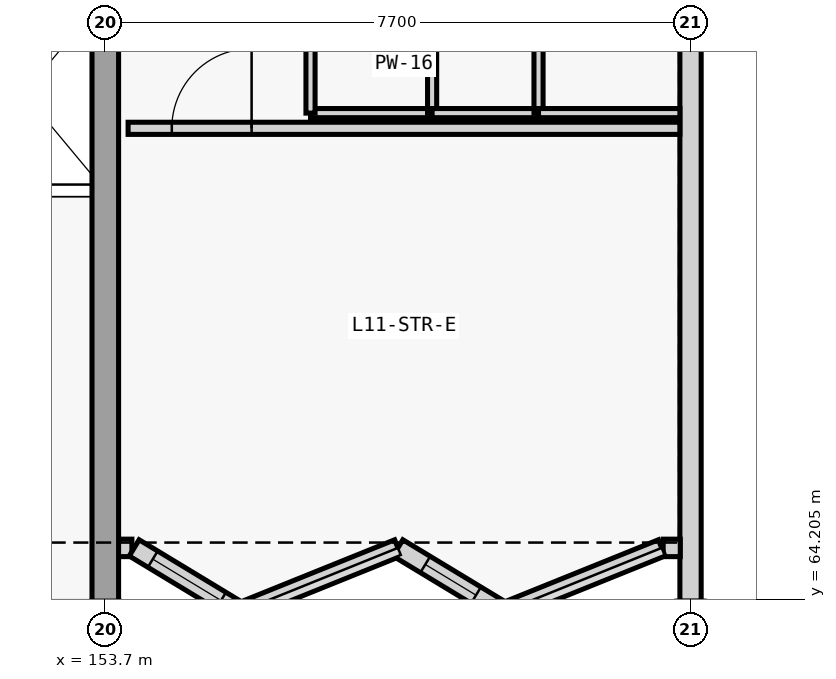
"""IFC4 building model, lengths in metres.
Left out: names, types, materials, properties, quantities, classifications, styles, units other than length and angle.
Written with IfcOpenShell. Run it as: python <this file> out.ifc"""

import sys

from ifc_helpers import new_model, si_unit, direction, frame, frame_2d, origin, place, context, subcontext, project, spatial, rectangle, extrude, element, fill, save


model = new_model("IFC4")
c1 = context("Model", 3, precision=1e-05, world=origin(), true_north=direction((0.0, 1.0)))
c2 = subcontext(c1, "Body", "Model", "MODEL_VIEW")
j1 = project(units=[si_unit("LENGTHUNIT", "METRE"), si_unit("PLANEANGLEUNIT", "RADIAN")], contexts=[c1])
p1 = place(None, origin())
s1 = spatial("IfcSite", under=j1, at=p1, CompositionType="ELEMENT")
p2 = place(p1, origin())
s2 = spatial("IfcBuilding", under=s1, at=p2, CompositionType="ELEMENT")
p3 = place(p2, frame((0.0, 0.0, 43.2)))
s3 = spatial("IfcBuildingStorey", under=s2, at=p3, CompositionType="ELEMENT", Elevation=43.2)
p4 = place(p3, frame((161.4, 96.822, 0.0), z_axis=(0.0, 0.0, 1.0), x_axis=(0.0, -1.0, 0.0)))
e1 = element("IfcWall", 1, at=p4, inside=s3, PredefinedType="SOLIDWALL", context=c2, shape_type="SweptSolid", body=[
    extrude(rectangle(XDim=32.644, YDim=0.28, at=frame_2d((16.322, 0.0))), origin(), (0.0, 0.0, 1.0), 3.06),
])
p5 = place(p4, frame((17.522, 0.0, 0.82)))
e2 = element("IfcOpeningElement", 2, at=p5, cuts=e1, PredefinedType="OPENING", context=c2, shape_type="SweptSolid", body=[
    extrude(rectangle(XDim=3.9, YDim=1.45, at=frame_2d((1.95, 0.725))), frame((0.0, 0.15, 0.0), z_axis=(0.0, -1.0, 0.0), x_axis=(1.0, 0.0, 0.0)), (0.0, 0.0, 1.0), 0.3),
])
p6 = place(p3, frame((154.05, 64.88, 0.0), z_axis=(0.0, 0.0, 1.0), x_axis=(-1.0, 0.0, 0.0)))
e3 = element("IfcWall", 3, at=p6, inside=s3, PredefinedType="SOLIDWALL", context=c2, shape_type="SweptSolid", body=[
    extrude(rectangle(XDim=0.18, YDim=0.23, at=frame_2d((0.09, 0.0))), origin(), (0.0, 0.0, 1.0), 3.66),
])
p7 = place(p3, frame((161.265, 64.88, 0.0), z_axis=(0.0, 0.0, 1.0), x_axis=(-1.0, 0.0, 0.0)))
e4 = element("IfcWall", 4, at=p7, inside=s3, PredefinedType="SOLIDWALL", context=c2, shape_type="SweptSolid", body=[
    extrude(rectangle(XDim=0.225, YDim=0.23, at=frame_2d((0.112, 0.0))), origin(), (0.0, 0.0, 1.0), 3.66),
])
p8 = place(p3, frame((155.468, 64.04, 0.0), z_axis=(0.0, 0.0, 1.0), x_axis=(-0.855561475997, 0.51770122734, 0.0)))
e5 = element("IfcWall", 5, at=p8, inside=s3, PredefinedType="SOLIDWALL", context=c2, shape_type="SweptSolid", body=[
    extrude(rectangle(XDim=1.622, YDim=0.25, at=frame_2d((0.811, 0.0))), origin(), (0.0, 0.0, 1.0), 3.66),
])
p9 = place(p8, frame((0.286, 0.0, 0.82)))
e6 = element("IfcOpeningElement", 6, at=p9, cuts=e5, PredefinedType="OPENING", context=c2, shape_type="SweptSolid", body=[
    extrude(rectangle(XDim=1.05, YDim=1.4, at=frame_2d((0.525, 0.7))), frame((0.0, 0.135, 0.0), z_axis=(0.0, -1.0, 0.0), x_axis=(1.0, 0.0, 0.0)), (0.0, 0.0, 1.0), 0.27),
])
p10 = place(p3, frame((157.55, 64.88, 0.0), z_axis=(0.0, 0.0, 1.0), x_axis=(-0.927392797001, -0.374089026933, 0.0)))
e7 = element("IfcWall", 7, at=p10, inside=s3, PredefinedType="SOLIDWALL", context=c2, shape_type="SweptSolid", body=[
    extrude(rectangle(XDim=2.245, YDim=0.23, at=frame_2d((1.123, 0.0))), origin(), (0.0, 0.0, 1.0), 3.66),
])
p11 = place(p3, frame((158.938, 64.04, 0.0), z_axis=(0.0, 0.0, 1.0), x_axis=(-0.855561475997, 0.51770122734, 0.0)))
e8 = element("IfcWall", 8, at=p11, inside=s3, PredefinedType="SOLIDWALL", context=c2, shape_type="SweptSolid", body=[
    extrude(rectangle(XDim=1.622, YDim=0.25, at=frame_2d((0.811, 0.0))), origin(), (0.0, 0.0, 1.0), 3.66),
])
p12 = place(p11, frame((0.421, 0.0, 0.82)))
e9 = element("IfcOpeningElement", 9, at=p12, cuts=e8, PredefinedType="OPENING", context=c2, shape_type="SweptSolid", body=[
    extrude(rectangle(XDim=0.78, YDim=1.3, at=frame_2d((0.39, 0.65))), frame((0.0, 0.135, 0.0), z_axis=(0.0, -1.0, 0.0), x_axis=(1.0, 0.0, 0.0)), (0.0, 0.0, 1.0), 0.27),
])
p13 = place(p3, frame((161.02, 64.88, 0.0), z_axis=(0.0, 0.0, 1.0), x_axis=(-0.927392797001, -0.374089026933, 0.0)))
e10 = element("IfcWall", 10, at=p13, inside=s3, PredefinedType="SOLIDWALL", context=c2, shape_type="SweptSolid", body=[
    extrude(rectangle(XDim=2.245, YDim=0.23, at=frame_2d((1.123, 0.0))), origin(), (0.0, 0.0, 1.0), 3.66),
])
p14 = place(p3, frame((153.7, 64.0, 0.0), z_axis=(0.0, 0.0, 1.0), x_axis=(0.0, 1.0, 0.0)))
e11 = element("IfcWall", 11, at=p14, inside=s3, PredefinedType="SHEAR", context=c2, shape_type="SweptSolid", body=[
    extrude(rectangle(XDim=8.4, YDim=0.35, at=frame_2d((4.2, 0.0))), origin(), (0.0, 0.0, 1.0), 3.9),
])
p15 = place(p3, frame((156.4, 70.6, 0.0), z_axis=(0.0, 0.0, 1.0), x_axis=(1.0, 0.0, 0.0)))
e12 = element("IfcWall", 12, at=p15, inside=s3, PredefinedType="PARTITIONING", context=c2, shape_type="SweptSolid", body=[
    extrude(rectangle(XDim=1.6, YDim=0.12, at=frame_2d((0.8, 0.0))), origin(), (0.0, 0.0, 1.0), 3.64),
])
p16 = place(p3, frame((156.4, 70.6, 0.0), z_axis=(0.0, 0.0, 1.0), x_axis=(0.0, 1.0, 0.0)))
e13 = element("IfcWall", 13, at=p16, inside=s3, PredefinedType="PARTITIONING", context=c2, shape_type="SweptSolid", body=[
    extrude(rectangle(XDim=5.2, YDim=0.12, at=frame_2d((2.6, 0.0))), origin(), (0.0, 0.0, 1.0), 3.64),
])
p17 = place(p16, frame((2.16, 0.0, 0.0)))
e14 = element("IfcOpeningElement", 14, at=p17, cuts=e13, PredefinedType="OPENING", context=c2, shape_type="SweptSolid", body=[
    extrude(rectangle(XDim=0.88, YDim=2.1, at=frame_2d((0.44, 1.05))), frame((0.0, 0.07, 0.0), z_axis=(0.0, -1.0, 0.0), x_axis=(1.0, 0.0, 0.0)), (0.0, 0.0, 1.0), 0.14),
])
p18 = place(p3, frame((158.0, 70.6, 0.0), z_axis=(0.0, 0.0, 1.0), x_axis=(0.0, 1.0, 0.0)))
e15 = element("IfcWall", 15, at=p18, inside=s3, PredefinedType="PARTITIONING", context=c2, shape_type="SweptSolid", body=[
    extrude(rectangle(XDim=5.2, YDim=0.12, at=frame_2d((2.6, 0.0))), origin(), (0.0, 0.0, 1.0), 3.64),
])
p19 = place(p3, frame((158.0, 70.6, 0.0), z_axis=(0.0, 0.0, 1.0), x_axis=(1.0, 0.0, 0.0)))
e16 = element("IfcWall", 16, at=p19, inside=s3, PredefinedType="PARTITIONING", context=c2, shape_type="SweptSolid", body=[
    extrude(rectangle(XDim=1.4, YDim=0.12, at=frame_2d((0.7, 0.0))), origin(), (0.0, 0.0, 1.0), 3.64),
])
p20 = place(p3, frame((159.4, 70.6, 0.0), z_axis=(0.0, 0.0, 1.0), x_axis=(0.0, 1.0, 0.0)))
e17 = element("IfcWall", 17, at=p20, inside=s3, PredefinedType="PARTITIONING", context=c2, shape_type="SweptSolid", body=[
    extrude(rectangle(XDim=5.2, YDim=0.12, at=frame_2d((2.6, 0.0))), origin(), (0.0, 0.0, 1.0), 3.64),
])
p21 = place(p3, frame((159.4, 70.6, 0.0), z_axis=(0.0, 0.0, 1.0), x_axis=(1.0, 0.0, 0.0)))
e18 = element("IfcWall", 18, at=p21, inside=s3, PredefinedType="PARTITIONING", context=c2, shape_type="SweptSolid", body=[
    extrude(rectangle(XDim=1.86, YDim=0.12, at=frame_2d((0.93, 0.0))), origin(), (0.0, 0.0, 1.0), 3.64),
])
p22 = place(p3, frame((154.0, 70.4, 0.0), z_axis=(0.0, 0.0, 1.0), x_axis=(1.0, 0.0, 0.0)))
e19 = element("IfcWall", 19, at=p22, inside=s3, PredefinedType="PARTITIONING", context=c2, shape_type="SweptSolid", body=[
    extrude(rectangle(XDim=7.26, YDim=0.16, at=frame_2d((3.63, 0.0))), origin(), (0.0, 0.0, 1.0), 3.64),
])
p23 = place(p22, frame((0.575, 0.0, 0.0)))
e20 = element("IfcOpeningElement", 20, at=p23, cuts=e19, PredefinedType="OPENING", context=c2, shape_type="SweptSolid", body=[
    extrude(rectangle(XDim=1.05, YDim=2.15, at=frame_2d((0.525, 1.075))), frame((0.0, 0.09, 0.0), z_axis=(0.0, -1.0, 0.0), x_axis=(1.0, 0.0, 0.0)), (0.0, 0.0, 1.0), 0.18),
])
p24 = place(p9, origin())
e21 = element("IfcWindow", 21, at=p24, inside=s3, PartitioningType="SINGLE_PANEL", PredefinedType="WINDOW", context=c2, shape_type="SweptSolid", body=[
    extrude(rectangle(XDim=1.05, YDim=1.4, at=frame_2d((0.525, 0.7))), frame((0.0, 0.03, 0.0), z_axis=(0.0, -1.0, 0.0), x_axis=(1.0, 0.0, 0.0)), (0.0, 0.0, 1.0), 0.06),
])
fill(e6, e21)
p25 = place(p12, origin())
e22 = element("IfcWindow", 22, at=p25, inside=s3, PartitioningType="SINGLE_PANEL", PredefinedType="WINDOW", context=c2, shape_type="SweptSolid", body=[
    extrude(rectangle(XDim=0.78, YDim=1.3, at=frame_2d((0.39, 0.65))), frame((0.0, 0.03, 0.0), z_axis=(0.0, -1.0, 0.0), x_axis=(1.0, 0.0, 0.0)), (0.0, 0.0, 1.0), 0.06),
])
fill(e9, e22)
p26 = place(p23, origin())
e23 = element("IfcDoor", 23, at=p26, inside=s3, OperationType="SINGLE_SWING_RIGHT", PredefinedType="DOOR", context=c2, shape_type="SweptSolid", body=[
    extrude(rectangle(XDim=1.05, YDim=2.15, at=frame_2d((0.525, 1.075))), frame((0.0, 0.025, 0.0), z_axis=(0.0, -1.0, 0.0), x_axis=(1.0, 0.0, 0.0)), (0.0, 0.0, 1.0), 0.05),
])
fill(e20, e23)
save(model, sys.argv[1])
